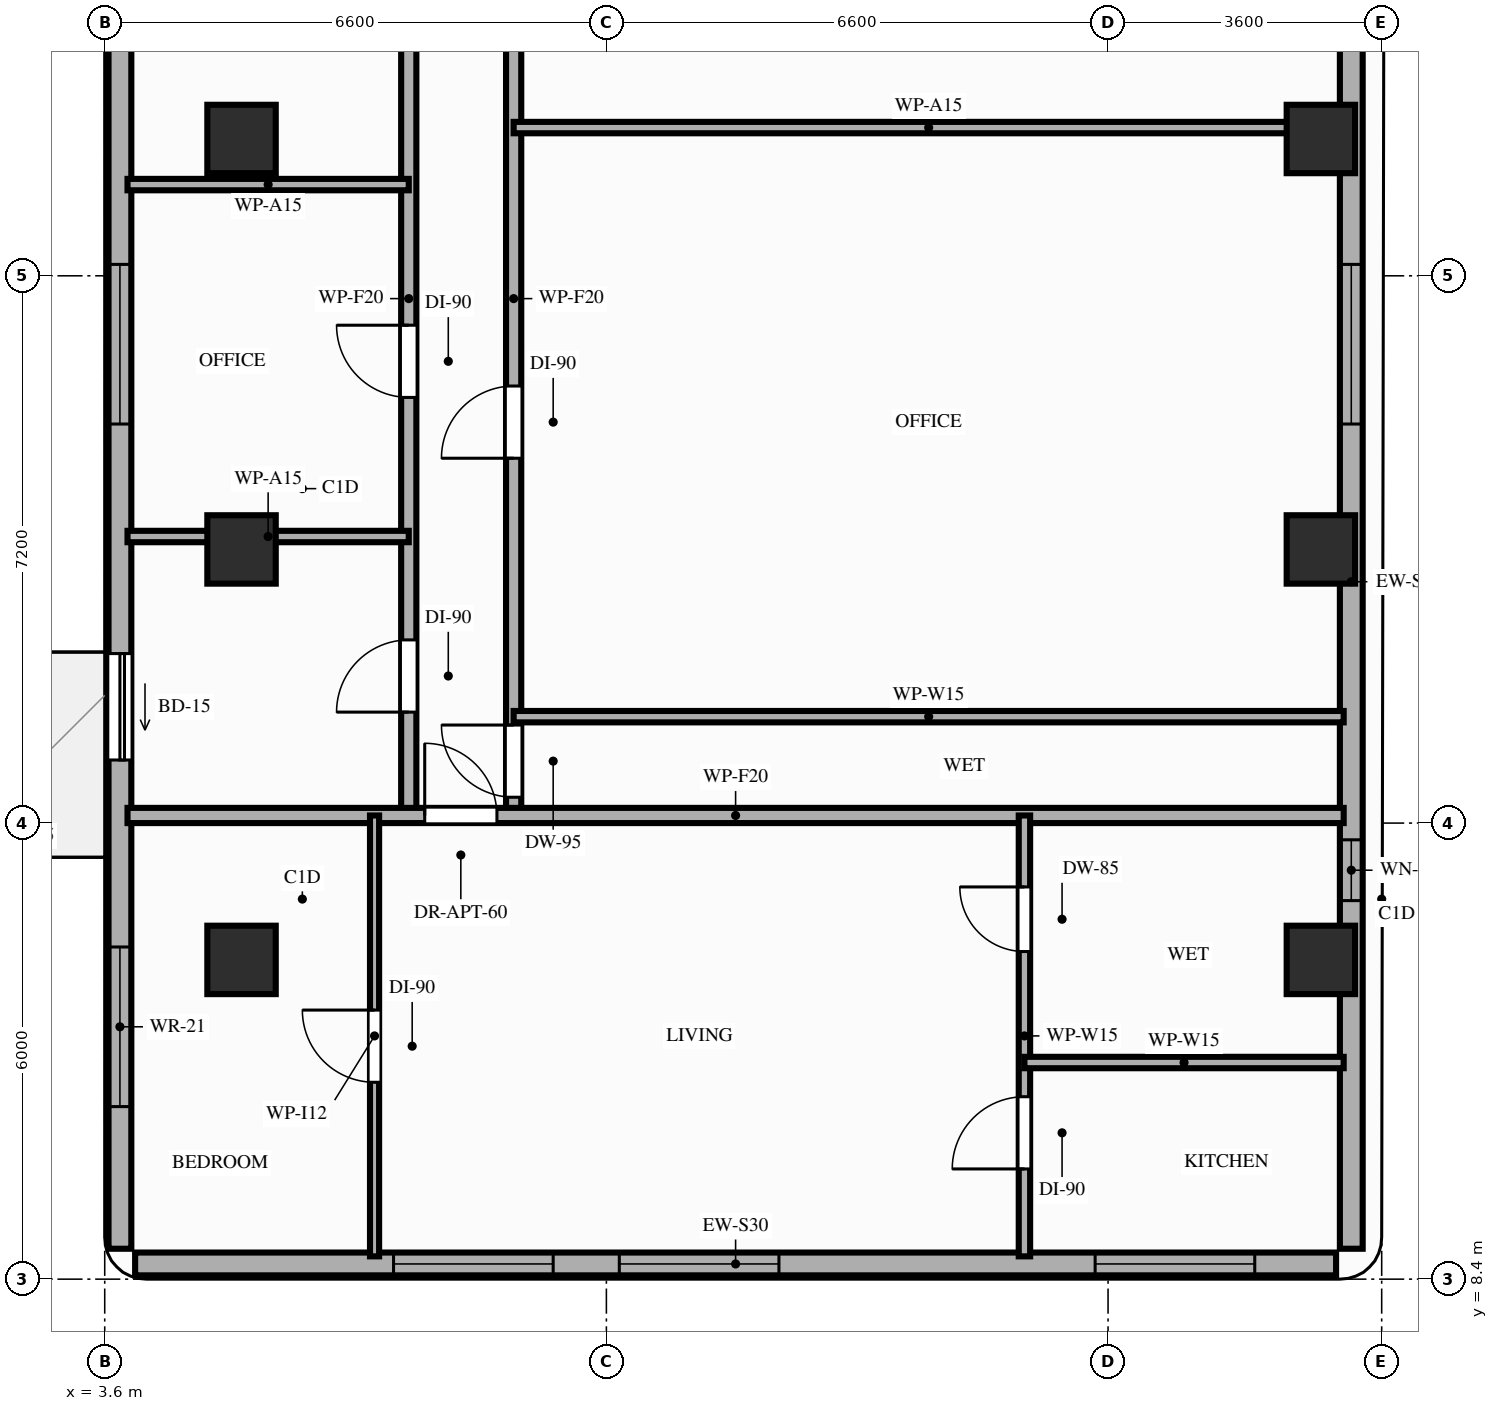
"""IFC4 building model, lengths in metres.
Left out: names, types, materials, properties, quantities, classifications, styles, units other than length and angle.
Written with IfcOpenShell. Run it as: python <this file> out.ifc"""

import sys

from ifc_helpers import new_model, si_unit, direction, frame, frame_2d, origin, origin_2d, place, context, subcontext, project, spatial, rectangle, extrude, element, fill, save


model = new_model("IFC4")
c1 = context("Model", 3, precision=1e-05, world=origin(), true_north=direction((0.0, 1.0)))
c2 = subcontext(c1, "Body", "Model", "MODEL_VIEW")
j1 = project(units=[si_unit("LENGTHUNIT", "METRE"), si_unit("PLANEANGLEUNIT", "RADIAN")], contexts=[c1])
p1 = place(None, origin())
s1 = spatial("IfcSite", under=j1, at=p1, CompositionType="ELEMENT")
p2 = place(p1, origin())
s2 = spatial("IfcBuilding", under=s1, at=p2, CompositionType="ELEMENT")
p3 = place(p2, frame((0.0, 0.0, 166.4)))
s3 = spatial("IfcBuildingStorey", under=s2, at=p3, CompositionType="ELEMENT", Elevation=166.4)
for number, where, z_axis, x_axis in (
    (1, (5.4, 12.6, 0.0), (0.0, 0.0, 1.0), (1.0, 0.0, 0.0)),
    (2, (19.6, 12.6, 0.0), (0.0, 0.0, 1.0), (1.0, 0.0, 0.0)),
    (3, (5.4, 18.0, 0.0), (0.0, 0.0, 1.0), (1.0, 0.0, 0.0)),
    (4, (19.6, 18.0, 0.0), (0.0, 0.0, 1.0), (1.0, 0.0, 0.0)),
    (5, (5.4, 23.4, 0.0), (0.0, 0.0, 1.0), (1.0, 0.0, 0.0)),
    (6, (19.6, 23.4, 0.0), (0.0, 0.0, 1.0), (1.0, 0.0, 0.0)),
):
    element("IfcColumn", number, at=place(p3, frame(where, z_axis=z_axis, x_axis=x_axis)), inside=s3, PredefinedType="COLUMN", context=c2, shape_type="SweptSolid", body=[
        extrude(rectangle(XDim=0.9, YDim=0.9, at=origin_2d()), origin(), (0.0, 0.0, 1.0), 3.2),
    ])
p4 = place(p3, frame((4.0, 8.6, 0.0), z_axis=(0.0, 0.0, 1.0), x_axis=(1.0, 0.0, 0.0)))
e7 = element("IfcWall", 7, at=p4, inside=s3, PredefinedType="STANDARD", context=c2, shape_type="SweptSolid", body=[
    extrude(rectangle(XDim=15.8, YDim=0.3, at=frame_2d((7.9, 0.0))), origin(), (0.0, 0.0, 1.0), 3.02),
])
p5 = place(p4, frame((6.37, 0.0, 0.85)))
e8 = element("IfcOpeningElement", 8, at=p5, cuts=e7, PredefinedType="OPENING", context=c2, shape_type="SweptSolid", body=[
    extrude(rectangle(XDim=2.1, YDim=1.8, at=frame_2d((1.05, 0.9))), frame((0.0, 0.16, 0.0), z_axis=(0.0, -1.0, 0.0), x_axis=(1.0, 0.0, 0.0)), (0.0, 0.0, 1.0), 0.32),
])
p6 = place(p4, frame((12.63, 0.0, 0.85)))
e9 = element("IfcOpeningElement", 9, at=p6, cuts=e7, PredefinedType="OPENING", context=c2, shape_type="SweptSolid", body=[
    extrude(rectangle(XDim=2.1, YDim=1.8, at=frame_2d((1.05, 0.9))), frame((0.0, 0.16, 0.0), z_axis=(0.0, -1.0, 0.0), x_axis=(1.0, 0.0, 0.0)), (0.0, 0.0, 1.0), 0.32),
])
p7 = place(p4, frame((3.4, 0.0, 0.85)))
e10 = element("IfcOpeningElement", 10, at=p7, cuts=e7, PredefinedType="OPENING", context=c2, shape_type="SweptSolid", body=[
    extrude(rectangle(XDim=2.1, YDim=1.8, at=frame_2d((1.05, 0.9))), frame((0.0, 0.16, 0.0), z_axis=(0.0, -1.0, 0.0), x_axis=(1.0, 0.0, 0.0)), (0.0, 0.0, 1.0), 0.32),
])
p8 = place(p3, frame((3.8, 42.1, 0.0), z_axis=(0.0, 0.0, 1.0), x_axis=(0.0, -1.0, 0.0)))
e11 = element("IfcWall", 11, at=p8, inside=s3, PredefinedType="STANDARD", context=c2, shape_type="SweptSolid", body=[
    extrude(rectangle(XDim=33.3, YDim=0.3, at=frame_2d((16.65, 0.0))), origin(), (0.0, 0.0, 1.0), 2.71),
])
p9 = place(p8, frame((25.47, 0.0, 0.0)))
e12 = element("IfcOpeningElement", 12, at=p9, cuts=e11, PredefinedType="OPENING", context=c2, shape_type="SweptSolid", body=[
    extrude(rectangle(XDim=1.4, YDim=2.1, at=frame_2d((0.7, 1.05))), frame((0.0, 0.16, 0.0), z_axis=(0.0, -1.0, 0.0), x_axis=(1.0, 0.0, 0.0)), (0.0, 0.0, 1.0), 0.32),
])
p10 = place(p8, frame((15.3, 0.0, 0.0)))
e13 = element("IfcOpeningElement", 13, at=p10, cuts=e11, PredefinedType="OPENING", context=c2, shape_type="SweptSolid", body=[
    extrude(rectangle(XDim=1.4, YDim=2.1, at=frame_2d((0.7, 1.05))), frame((0.0, 0.16, 0.0), z_axis=(0.0, -1.0, 0.0), x_axis=(1.0, 0.0, 0.0)), (0.0, 0.0, 1.0), 0.32),
])
p11 = place(p8, frame((29.33, 0.0, 0.85)))
e14 = element("IfcOpeningElement", 14, at=p11, cuts=e11, PredefinedType="OPENING", context=c2, shape_type="SweptSolid", body=[
    extrude(rectangle(XDim=2.1, YDim=1.61, at=frame_2d((1.05, 0.805))), frame((0.0, 0.16, 0.0), z_axis=(0.0, -1.0, 0.0), x_axis=(1.0, 0.0, 0.0)), (0.0, 0.0, 1.0), 0.32),
])
p12 = place(p8, frame((20.35, 0.0, 0.85)))
e15 = element("IfcOpeningElement", 15, at=p12, cuts=e11, PredefinedType="OPENING", context=c2, shape_type="SweptSolid", body=[
    extrude(rectangle(XDim=2.1, YDim=1.61, at=frame_2d((1.05, 0.805))), frame((0.0, 0.16, 0.0), z_axis=(0.0, -1.0, 0.0), x_axis=(1.0, 0.0, 0.0)), (0.0, 0.0, 1.0), 0.32),
])
p13 = place(p8, frame((9.75, 0.0, 0.85)))
e16 = element("IfcOpeningElement", 16, at=p13, cuts=e11, PredefinedType="OPENING", context=c2, shape_type="SweptSolid", body=[
    extrude(rectangle(XDim=2.1, YDim=1.61, at=frame_2d((1.05, 0.805))), frame((0.0, 0.16, 0.0), z_axis=(0.0, -1.0, 0.0), x_axis=(1.0, 0.0, 0.0)), (0.0, 0.0, 1.0), 0.32),
])
p14 = place(p8, frame((3.65, 0.0, 0.85)))
e17 = element("IfcOpeningElement", 17, at=p14, cuts=e11, PredefinedType="OPENING", context=c2, shape_type="SweptSolid", body=[
    extrude(rectangle(XDim=2.1, YDim=1.61, at=frame_2d((1.05, 0.805))), frame((0.0, 0.16, 0.0), z_axis=(0.0, -1.0, 0.0), x_axis=(1.0, 0.0, 0.0)), (0.0, 0.0, 1.0), 0.32),
])
p15 = place(p3, frame((20.0, 8.8, 0.0), z_axis=(0.0, 0.0, 1.0), x_axis=(0.0, 1.0, 0.0)))
e18 = element("IfcWall", 18, at=p15, inside=s3, PredefinedType="STANDARD", context=c2, shape_type="SweptSolid", body=[
    extrude(rectangle(XDim=17.55, YDim=0.3, at=frame_2d((8.775, 0.0))), origin(), (0.0, 0.0, 1.0), 2.45),
])
p16 = place(p15, frame((4.58, 0.0, 0.85)))
e19 = element("IfcOpeningElement", 19, at=p16, cuts=e18, PredefinedType="OPENING", context=c2, shape_type="SweptSolid", body=[
    extrude(rectangle(XDim=0.8, YDim=1.35, at=frame_2d((0.4, 0.675))), frame((0.0, 0.16, 0.0), z_axis=(0.0, -1.0, 0.0), x_axis=(1.0, 0.0, 0.0)), (0.0, 0.0, 1.0), 0.32),
])
p17 = place(p15, frame((10.85, 0.0, 0.85)))
e20 = element("IfcOpeningElement", 20, at=p17, cuts=e18, PredefinedType="OPENING", context=c2, shape_type="SweptSolid", body=[
    extrude(rectangle(XDim=2.1, YDim=1.35, at=frame_2d((1.05, 0.675))), frame((0.0, 0.16, 0.0), z_axis=(0.0, -1.0, 0.0), x_axis=(1.0, 0.0, 0.0)), (0.0, 0.0, 1.0), 0.32),
])
p18 = place(p3, frame((7.6, 14.5, 0.0), z_axis=(0.0, 0.0, 1.0), x_axis=(0.0, 1.0, 0.0)))
e21 = element("IfcWall", 21, at=p18, inside=s3, PredefinedType="PARTITIONING", context=c2, shape_type="SweptSolid", body=[
    extrude(rectangle(XDim=13.6, YDim=0.2, at=frame_2d((6.8, 0.0))), origin(), (0.0, 0.0, 1.0), 2.45),
])
p19 = place(p18, frame((1.36, 0.0, 0.0)))
e22 = element("IfcOpeningElement", 22, at=p19, cuts=e21, PredefinedType="OPENING", context=c2, shape_type="SweptSolid", body=[
    extrude(rectangle(XDim=0.95, YDim=2.15, at=frame_2d((0.475, 1.075))), frame((0.0, 0.11, 0.0), z_axis=(0.0, -1.0, 0.0), x_axis=(1.0, 0.0, 0.0)), (0.0, 0.0, 1.0), 0.22),
])
p20 = place(p18, frame((5.5, 0.0, 0.0)))
e23 = element("IfcOpeningElement", 23, at=p20, cuts=e21, PredefinedType="OPENING", context=c2, shape_type="SweptSolid", body=[
    extrude(rectangle(XDim=0.95, YDim=2.15, at=frame_2d((0.475, 1.075))), frame((0.0, 0.11, 0.0), z_axis=(0.0, -1.0, 0.0), x_axis=(1.0, 0.0, 0.0)), (0.0, 0.0, 1.0), 0.22),
])
p21 = place(p18, frame((10.47, 0.0, 0.0)))
e24 = element("IfcOpeningElement", 24, at=p21, cuts=e21, PredefinedType="OPENING", context=c2, shape_type="SweptSolid", body=[
    extrude(rectangle(XDim=0.95, YDim=2.15, at=frame_2d((0.475, 1.075))), frame((0.0, 0.11, 0.0), z_axis=(0.0, -1.0, 0.0), x_axis=(1.0, 0.0, 0.0)), (0.0, 0.0, 1.0), 0.22),
])
p22 = place(p3, frame((8.98, 14.5, 0.0), z_axis=(0.0, 0.0, 1.0), x_axis=(0.0, 1.0, 0.0)))
e25 = element("IfcWall", 25, at=p22, inside=s3, PredefinedType="PARTITIONING", context=c2, shape_type="SweptSolid", body=[
    extrude(rectangle(XDim=13.6, YDim=0.2, at=frame_2d((6.8, 0.0))), origin(), (0.0, 0.0, 1.0), 2.45),
])
p23 = place(p22, frame((0.24, 0.0, 0.0)))
e26 = element("IfcOpeningElement", 26, at=p23, cuts=e25, PredefinedType="OPENING", context=c2, shape_type="SweptSolid", body=[
    extrude(rectangle(XDim=0.95, YDim=2.1, at=frame_2d((0.475, 1.05))), frame((0.0, 0.11, 0.0), z_axis=(0.0, -1.0, 0.0), x_axis=(1.0, 0.0, 0.0)), (0.0, 0.0, 1.0), 0.22),
])
p24 = place(p22, frame((4.7, 0.0, 0.0)))
e27 = element("IfcOpeningElement", 27, at=p24, cuts=e25, PredefinedType="OPENING", context=c2, shape_type="SweptSolid", body=[
    extrude(rectangle(XDim=0.95, YDim=2.15, at=frame_2d((0.475, 1.075))), frame((0.0, 0.11, 0.0), z_axis=(0.0, -1.0, 0.0), x_axis=(1.0, 0.0, 0.0)), (0.0, 0.0, 1.0), 0.22),
])
p25 = place(p22, frame((10.85, 0.0, 0.0)))
e28 = element("IfcOpeningElement", 28, at=p25, cuts=e25, PredefinedType="OPENING", context=c2, shape_type="SweptSolid", body=[
    extrude(rectangle(XDim=0.95, YDim=2.15, at=frame_2d((0.475, 1.075))), frame((0.0, 0.11, 0.0), z_axis=(0.0, -1.0, 0.0), x_axis=(1.0, 0.0, 0.0)), (0.0, 0.0, 1.0), 0.22),
])
p26 = place(p3, frame((3.9, 14.5, 0.0), z_axis=(0.0, 0.0, 1.0), x_axis=(1.0, 0.0, 0.0)))
e29 = element("IfcWall", 29, at=p26, inside=s3, PredefinedType="PARTITIONING", context=c2, shape_type="SweptSolid", body=[
    extrude(rectangle(XDim=16.0, YDim=0.2, at=frame_2d((8.0, 0.0))), origin(), (0.0, 0.0, 1.0), 2.45),
])
p27 = place(p26, frame((3.91, 0.0, 0.0)))
e30 = element("IfcOpeningElement", 30, at=p27, cuts=e29, PredefinedType="OPENING", context=c2, shape_type="SweptSolid", body=[
    extrude(rectangle(XDim=0.95, YDim=2.15, at=frame_2d((0.475, 1.075))), frame((0.0, 0.11, 0.0), z_axis=(0.0, -1.0, 0.0), x_axis=(1.0, 0.0, 0.0)), (0.0, 0.0, 1.0), 0.22),
])
p28 = place(p3, frame((7.15, 8.7, 0.0), z_axis=(0.0, 0.0, 1.0), x_axis=(0.0, 1.0, 0.0)))
e31 = element("IfcWall", 31, at=p28, inside=s3, PredefinedType="PARTITIONING", context=c2, shape_type="SweptSolid", body=[
    extrude(rectangle(XDim=5.8, YDim=0.12, at=frame_2d((2.9, 0.0))), origin(), (0.0, 0.0, 1.0), 2.45),
])
p29 = place(p28, frame((2.29, 0.0, 0.0)))
e32 = element("IfcOpeningElement", 32, at=p29, cuts=e31, PredefinedType="OPENING", context=c2, shape_type="SweptSolid", body=[
    extrude(rectangle(XDim=0.95, YDim=2.15, at=frame_2d((0.475, 1.075))), frame((0.0, 0.07, 0.0), z_axis=(0.0, -1.0, 0.0), x_axis=(1.0, 0.0, 0.0)), (0.0, 0.0, 1.0), 0.14),
])
p30 = place(p3, frame((15.7, 8.7, 0.0), z_axis=(0.0, 0.0, 1.0), x_axis=(0.0, 1.0, 0.0)))
e33 = element("IfcWall", 33, at=p30, inside=s3, PredefinedType="PARTITIONING", context=c2, shape_type="SweptSolid", body=[
    extrude(rectangle(XDim=5.8, YDim=0.15, at=frame_2d((2.9, 0.0))), origin(), (0.0, 0.0, 1.0), 2.45),
])
p31 = place(p30, frame((1.15, 0.0, 0.0)))
e34 = element("IfcOpeningElement", 34, at=p31, cuts=e33, PredefinedType="OPENING", context=c2, shape_type="SweptSolid", body=[
    extrude(rectangle(XDim=0.95, YDim=2.15, at=frame_2d((0.475, 1.075))), frame((0.0, 0.085, 0.0), z_axis=(0.0, -1.0, 0.0), x_axis=(1.0, 0.0, 0.0)), (0.0, 0.0, 1.0), 0.17),
])
p32 = place(p30, frame((4.01, 0.0, 0.0)))
e35 = element("IfcOpeningElement", 35, at=p32, cuts=e33, PredefinedType="OPENING", context=c2, shape_type="SweptSolid", body=[
    extrude(rectangle(XDim=0.85, YDim=2.1, at=frame_2d((0.425, 1.05))), frame((0.0, 0.085, 0.0), z_axis=(0.0, -1.0, 0.0), x_axis=(1.0, 0.0, 0.0)), (0.0, 0.0, 1.0), 0.17),
])
p33 = place(p3, frame((15.7, 11.25, 0.0), z_axis=(0.0, 0.0, 1.0), x_axis=(1.0, 0.0, 0.0)))
e36 = element("IfcWall", 36, at=p33, inside=s3, PredefinedType="PARTITIONING", context=c2, shape_type="SweptSolid", body=[
    extrude(rectangle(XDim=4.2, YDim=0.15, at=frame_2d((2.1, 0.0))), origin(), (0.0, 0.0, 1.0), 3.02),
])
for number, where, z_axis, x_axis in (
    (37, (3.9, 18.17, 0.0), (0.0, 0.0, 1.0), (1.0, 0.0, 0.0)),
    (38, (3.9, 22.8, 0.0), (0.0, 0.0, 1.0), (1.0, 0.0, 0.0)),
):
    element("IfcWall", number, at=place(p3, frame(where, z_axis=z_axis, x_axis=x_axis)), inside=s3, PredefinedType="PARTITIONING", context=c2, shape_type="SweptSolid", body=[
        extrude(rectangle(XDim=3.7, YDim=0.15, at=frame_2d((1.85, 0.0))), origin(), (0.0, 0.0, 1.0), 2.45),
    ])
for number, where, z_axis, x_axis in (
    (39, (8.98, 15.8, 0.0), (0.0, 0.0, 1.0), (1.0, 0.0, 0.0)),
    (40, (8.98, 23.55, 0.0), (0.0, 0.0, 1.0), (1.0, 0.0, 0.0)),
):
    element("IfcWall", number, at=place(p3, frame(where, z_axis=z_axis, x_axis=x_axis)), inside=s3, PredefinedType="PARTITIONING", context=c2, shape_type="SweptSolid", body=[
        extrude(rectangle(XDim=10.92, YDim=0.15, at=frame_2d((5.46, 0.0))), origin(), (0.0, 0.0, 1.0), 2.45),
    ])
p34 = place(p9, origin())
e41 = element("IfcDoor", 41, at=p34, inside=s3, OperationType="SLIDING_TO_RIGHT", PredefinedType="DOOR", context=c2, shape_type="SweptSolid", body=[
    extrude(rectangle(XDim=1.4, YDim=2.1, at=frame_2d((0.7, 1.05))), frame((0.0, 0.025, 0.0), z_axis=(0.0, -1.0, 0.0), x_axis=(1.0, 0.0, 0.0)), (0.0, 0.0, 1.0), 0.05),
])
fill(e12, e41)
p35 = place(p11, origin())
e42 = element("IfcWindow", 42, at=p35, inside=s3, PartitioningType="SINGLE_PANEL", PredefinedType="WINDOW", context=c2, shape_type="SweptSolid", body=[
    extrude(rectangle(XDim=2.1, YDim=1.61, at=frame_2d((1.05, 0.805))), frame((0.0, 0.03, 0.0), z_axis=(0.0, -1.0, 0.0), x_axis=(1.0, 0.0, 0.0)), (0.0, 0.0, 1.0), 0.06),
])
fill(e14, e42)
p36 = place(p5, origin())
e43 = element("IfcWindow", 43, at=p36, inside=s3, PartitioningType="SINGLE_PANEL", PredefinedType="WINDOW", context=c2, shape_type="SweptSolid", body=[
    extrude(rectangle(XDim=2.1, YDim=1.8, at=frame_2d((1.05, 0.9))), frame((0.0, 0.03, 0.0), z_axis=(0.0, -1.0, 0.0), x_axis=(1.0, 0.0, 0.0)), (0.0, 0.0, 1.0), 0.06),
])
fill(e8, e43)
p37 = place(p6, origin())
e44 = element("IfcWindow", 44, at=p37, inside=s3, PartitioningType="SINGLE_PANEL", PredefinedType="WINDOW", context=c2, shape_type="SweptSolid", body=[
    extrude(rectangle(XDim=2.1, YDim=1.8, at=frame_2d((1.05, 0.9))), frame((0.0, 0.03, 0.0), z_axis=(0.0, -1.0, 0.0), x_axis=(1.0, 0.0, 0.0)), (0.0, 0.0, 1.0), 0.06),
])
fill(e9, e44)
p38 = place(p16, origin())
e45 = element("IfcWindow", 45, at=p38, inside=s3, PartitioningType="SINGLE_PANEL", PredefinedType="WINDOW", context=c2, shape_type="SweptSolid", body=[
    extrude(rectangle(XDim=0.8, YDim=1.35, at=frame_2d((0.4, 0.675))), frame((0.0, 0.03, 0.0), z_axis=(0.0, -1.0, 0.0), x_axis=(1.0, 0.0, 0.0)), (0.0, 0.0, 1.0), 0.06),
])
fill(e19, e45)
p39 = place(p12, origin())
e46 = element("IfcWindow", 46, at=p39, inside=s3, PartitioningType="SINGLE_PANEL", PredefinedType="WINDOW", context=c2, shape_type="SweptSolid", body=[
    extrude(rectangle(XDim=2.1, YDim=1.61, at=frame_2d((1.05, 0.805))), frame((0.0, 0.03, 0.0), z_axis=(0.0, -1.0, 0.0), x_axis=(1.0, 0.0, 0.0)), (0.0, 0.0, 1.0), 0.06),
])
fill(e15, e46)
p40 = place(p17, origin())
e47 = element("IfcWindow", 47, at=p40, inside=s3, PartitioningType="SINGLE_PANEL", PredefinedType="WINDOW", context=c2, shape_type="SweptSolid", body=[
    extrude(rectangle(XDim=2.1, YDim=1.35, at=frame_2d((1.05, 0.675))), frame((0.0, 0.03, 0.0), z_axis=(0.0, -1.0, 0.0), x_axis=(1.0, 0.0, 0.0)), (0.0, 0.0, 1.0), 0.06),
])
fill(e20, e47)
p41 = place(p7, origin())
e48 = element("IfcWindow", 48, at=p41, inside=s3, PartitioningType="SINGLE_PANEL", PredefinedType="WINDOW", context=c2, shape_type="SweptSolid", body=[
    extrude(rectangle(XDim=2.1, YDim=1.8, at=frame_2d((1.05, 0.9))), frame((0.0, 0.03, 0.0), z_axis=(0.0, -1.0, 0.0), x_axis=(1.0, 0.0, 0.0)), (0.0, 0.0, 1.0), 0.06),
])
fill(e10, e48)
p42 = place(p27, origin())
e49 = element("IfcDoor", 49, at=p42, inside=s3, OperationType="SINGLE_SWING_LEFT", PredefinedType="DOOR", context=c2, shape_type="SweptSolid", body=[
    extrude(rectangle(XDim=0.95, YDim=2.15, at=frame_2d((0.475, 1.075))), frame((0.0, 0.025, 0.0), z_axis=(0.0, -1.0, 0.0), x_axis=(1.0, 0.0, 0.0)), (0.0, 0.0, 1.0), 0.05),
])
fill(e30, e49)
p43 = place(p29, origin())
e50 = element("IfcDoor", 50, at=p43, inside=s3, OperationType="SINGLE_SWING_RIGHT", PredefinedType="DOOR", context=c2, shape_type="SweptSolid", body=[
    extrude(rectangle(XDim=0.95, YDim=2.15, at=frame_2d((0.475, 1.075))), frame((0.0, 0.025, 0.0), z_axis=(0.0, -1.0, 0.0), x_axis=(1.0, 0.0, 0.0)), (0.0, 0.0, 1.0), 0.05),
])
fill(e32, e50)
p44 = place(p31, origin())
e51 = element("IfcDoor", 51, at=p44, inside=s3, OperationType="SINGLE_SWING_LEFT", PredefinedType="DOOR", context=c2, shape_type="SweptSolid", body=[
    extrude(rectangle(XDim=0.95, YDim=2.15, at=frame_2d((0.475, 1.075))), frame((0.0, 0.025, 0.0), z_axis=(0.0, -1.0, 0.0), x_axis=(1.0, 0.0, 0.0)), (0.0, 0.0, 1.0), 0.05),
])
fill(e34, e51)
p45 = place(p32, origin())
e52 = element("IfcDoor", 52, at=p45, inside=s3, OperationType="SINGLE_SWING_RIGHT", PredefinedType="DOOR", context=c2, shape_type="SweptSolid", body=[
    extrude(rectangle(XDim=0.85, YDim=2.1, at=frame_2d((0.425, 1.05))), frame((0.0, 0.025, 0.0), z_axis=(0.0, -1.0, 0.0), x_axis=(1.0, 0.0, 0.0)), (0.0, 0.0, 1.0), 0.05),
])
fill(e35, e52)
p46 = place(p19, origin())
e53 = element("IfcDoor", 53, at=p46, inside=s3, OperationType="SINGLE_SWING_LEFT", PredefinedType="DOOR", context=c2, shape_type="SweptSolid", body=[
    extrude(rectangle(XDim=0.95, YDim=2.15, at=frame_2d((0.475, 1.075))), frame((0.0, 0.025, 0.0), z_axis=(0.0, -1.0, 0.0), x_axis=(1.0, 0.0, 0.0)), (0.0, 0.0, 1.0), 0.05),
])
fill(e22, e53)
p47 = place(p20, origin())
e54 = element("IfcDoor", 54, at=p47, inside=s3, OperationType="SINGLE_SWING_RIGHT", PredefinedType="DOOR", context=c2, shape_type="SweptSolid", body=[
    extrude(rectangle(XDim=0.95, YDim=2.15, at=frame_2d((0.475, 1.075))), frame((0.0, 0.025, 0.0), z_axis=(0.0, -1.0, 0.0), x_axis=(1.0, 0.0, 0.0)), (0.0, 0.0, 1.0), 0.05),
])
fill(e23, e54)
p48 = place(p23, origin())
e55 = element("IfcDoor", 55, at=p48, inside=s3, OperationType="SINGLE_SWING_RIGHT", PredefinedType="DOOR", context=c2, shape_type="SweptSolid", body=[
    extrude(rectangle(XDim=0.95, YDim=2.1, at=frame_2d((0.475, 1.05))), frame((0.0, 0.025, 0.0), z_axis=(0.0, -1.0, 0.0), x_axis=(1.0, 0.0, 0.0)), (0.0, 0.0, 1.0), 0.05),
])
fill(e26, e55)
p49 = place(p24, origin())
e56 = element("IfcDoor", 56, at=p49, inside=s3, OperationType="SINGLE_SWING_LEFT", PredefinedType="DOOR", context=c2, shape_type="SweptSolid", body=[
    extrude(rectangle(XDim=0.95, YDim=2.15, at=frame_2d((0.475, 1.075))), frame((0.0, 0.025, 0.0), z_axis=(0.0, -1.0, 0.0), x_axis=(1.0, 0.0, 0.0)), (0.0, 0.0, 1.0), 0.05),
])
fill(e27, e56)
save(model, sys.argv[1])
